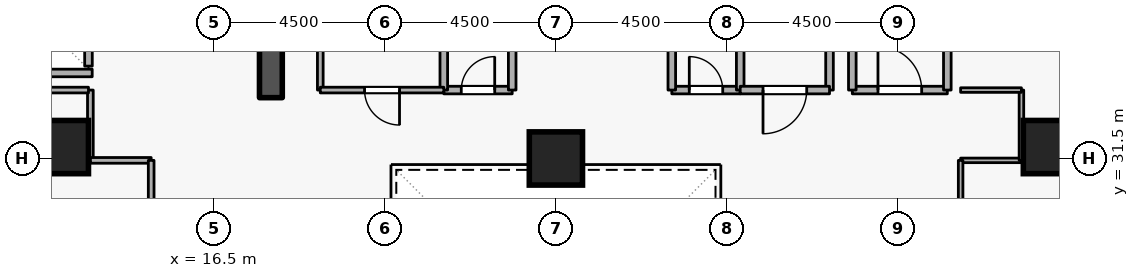
"""IFC4 building model, lengths in metres.
Left out: names, types, materials, properties, quantities, classifications, styles, units other than length and angle.
Written with IfcOpenShell. Run it as: python <this file> out.ifc"""

import sys

from ifc_helpers import new_model, si_unit, direction, frame, frame_2d, origin, origin_2d, place, context, subcontext, project, spatial, rectangle, extrude, element, fill, save


model = new_model("IFC4")
c1 = context("Model", 3, precision=1e-05, world=origin(), true_north=direction((0.0, 1.0)))
c2 = subcontext(c1, "Body", "Model", "MODEL_VIEW")
j1 = project(units=[si_unit("LENGTHUNIT", "METRE"), si_unit("PLANEANGLEUNIT", "RADIAN")], contexts=[c1])
p1 = place(None, origin())
s1 = spatial("IfcSite", under=j1, at=p1, CompositionType="ELEMENT")
p2 = place(p1, origin())
s2 = spatial("IfcBuilding", under=s1, at=p2, CompositionType="ELEMENT")
p3 = place(p2, frame((0.0, 0.0, 35.1)))
s3 = spatial("IfcBuildingStorey", under=s2, at=p3, CompositionType="ELEMENT", Elevation=35.1)
p4 = place(p3, frame((18.0, 33.1, 0.0), z_axis=(0.0, 0.0, 1.0), x_axis=(0.0, 1.0, 0.0)))
e1 = element("IfcWall", 1, at=p4, inside=s3, PredefinedType="SHEAR", context=c2, shape_type="SweptSolid", body=[
    extrude(rectangle(XDim=5.7, YDim=0.6, at=frame_2d((2.85, 0.0))), origin(), (0.0, 0.0, 1.0), 3.6),
])
for number, where, z_axis, x_axis in (
    (2, (12.5, 31.8, 0.0), (0.0, 0.0, 1.0), (1.0, 0.0, 0.0)),
    (3, (38.5, 31.8, 0.0), (0.0, 0.0, 1.0), (1.0, 0.0, 0.0)),
    (4, (25.5, 31.5, 0.0), (0.0, 0.0, 1.0), (1.0, 0.0, 0.0)),
):
    element("IfcColumn", number, at=place(p3, frame(where, z_axis=z_axis, x_axis=x_axis)), inside=s3, PredefinedType="COLUMN", context=c2, shape_type="SweptSolid", body=[
        extrude(rectangle(XDim=1.4, YDim=1.4, at=origin_2d()), origin(), (0.0, 0.0, 1.0), 3.6),
    ])
p5 = place(p3, frame((13.2, 33.93, 0.0), z_axis=(0.0, 0.0, 1.0), x_axis=(0.0, 1.0, 0.0)))
e5 = element("IfcWall", 5, at=p5, inside=s3, PredefinedType="STANDARD", context=c2, shape_type="SweptSolid", body=[
    extrude(rectangle(XDim=1.94, YDim=0.2, at=frame_2d((0.97, 0.0))), origin(), (0.0, 0.0, 1.0), 3.34),
])
p6 = place(p3, frame((11.002, 33.75, 0.0), z_axis=(0.0, 0.0, 1.0), x_axis=(1.0, 0.0, 0.0)))
e6 = element("IfcWall", 6, at=p6, inside=s3, PredefinedType="STANDARD", context=c2, shape_type="SweptSolid", body=[
    extrude(rectangle(XDim=2.296, YDim=0.2, at=frame_2d((1.148, 0.0))), origin(), (0.0, 0.0, 1.0), 3.34),
])
p7 = place(p3, frame((33.3, 33.3, 0.0), z_axis=(0.0, 0.0, 1.0), x_axis=(1.0, 0.0, 0.0)))
e7 = element("IfcWall", 7, at=p7, inside=s3, PredefinedType="STANDARD", context=c2, shape_type="SweptSolid", body=[
    extrude(rectangle(XDim=2.5, YDim=0.2, at=frame_2d((1.25, 0.0))), origin(), (0.0, 0.0, 1.0), 3.34),
])
p8 = place(p7, frame((0.675, 0.0, 0.0)))
e8 = element("IfcOpeningElement", 8, at=p8, cuts=e7, PredefinedType="OPENING", context=c2, shape_type="SweptSolid", body=[
    extrude(rectangle(XDim=1.15, YDim=2.1, at=frame_2d((0.575, 1.05))), frame((0.0, 0.11, 0.0), z_axis=(0.0, -1.0, 0.0), x_axis=(1.0, 0.0, 0.0)), (0.0, 0.0, 1.0), 0.22),
])
p9 = place(p3, frame((35.8, 33.3, 0.0), z_axis=(0.0, 0.0, 1.0), x_axis=(0.0, 1.0, 0.0)))
e9 = element("IfcWall", 9, at=p9, inside=s3, PredefinedType="STANDARD", context=c2, shape_type="SweptSolid", body=[
    extrude(rectangle(XDim=5.7, YDim=0.2, at=frame_2d((2.85, 0.0))), origin(), (0.0, 0.0, 1.0), 3.34),
])
p10 = place(p3, frame((33.3, 35.6, 0.0), z_axis=(0.0, 0.0, 1.0), x_axis=(0.0, -1.0, 0.0)))
e10 = element("IfcWall", 10, at=p10, inside=s3, PredefinedType="STANDARD", context=c2, shape_type="SweptSolid", body=[
    extrude(rectangle(XDim=2.3, YDim=0.2, at=frame_2d((1.15, 0.0))), origin(), (0.0, 0.0, 1.0), 2.545),
])
p11 = place(p3, frame((22.55, 33.3, 0.0), z_axis=(0.0, 0.0, 1.0), x_axis=(1.0, 0.0, 0.0)))
e11 = element("IfcWall", 11, at=p11, inside=s3, PredefinedType="STANDARD", context=c2, shape_type="SweptSolid", body=[
    extrude(rectangle(XDim=1.8, YDim=0.2, at=frame_2d((0.9, 0.0))), origin(), (0.0, 0.0, 1.0), 3.34),
])
p12 = place(p11, frame((0.46, 0.0, 0.0)))
e12 = element("IfcOpeningElement", 12, at=p12, cuts=e11, PredefinedType="OPENING", context=c2, shape_type="SweptSolid", body=[
    extrude(rectangle(XDim=0.88, YDim=2.04, at=frame_2d((0.44, 1.02))), frame((0.0, 0.11, 0.0), z_axis=(0.0, -1.0, 0.0), x_axis=(1.0, 0.0, 0.0)), (0.0, 0.0, 1.0), 0.22),
])
for number, where, z_axis, x_axis in (
    (13, (24.35, 33.3, 0.0), (0.0, 0.0, 1.0), (0.0, 1.0, 0.0)),
    (14, (22.55, 35.35, 0.0), (0.0, 0.0, 1.0), (0.0, -1.0, 0.0)),
):
    element("IfcWall", number, at=place(p3, frame(where, z_axis=z_axis, x_axis=x_axis)), inside=s3, PredefinedType="STANDARD", context=c2, shape_type="SweptSolid", body=[
        extrude(rectangle(XDim=2.05, YDim=0.2, at=frame_2d((1.025, 0.0))), origin(), (0.0, 0.0, 1.0), 3.34),
    ])
p13 = place(p3, frame((28.55, 33.3, 0.0), z_axis=(0.0, 0.0, 1.0), x_axis=(1.0, 0.0, 0.0)))
e15 = element("IfcWall", 15, at=p13, inside=s3, PredefinedType="STANDARD", context=c2, shape_type="SweptSolid", body=[
    extrude(rectangle(XDim=1.8, YDim=0.2, at=frame_2d((0.9, 0.0))), origin(), (0.0, 0.0, 1.0), 3.34),
])
p14 = place(p13, frame((0.46, 0.0, 0.0)))
e16 = element("IfcOpeningElement", 16, at=p14, cuts=e15, PredefinedType="OPENING", context=c2, shape_type="SweptSolid", body=[
    extrude(rectangle(XDim=0.88, YDim=2.04, at=frame_2d((0.44, 1.02))), frame((0.0, 0.11, 0.0), z_axis=(0.0, -1.0, 0.0), x_axis=(1.0, 0.0, 0.0)), (0.0, 0.0, 1.0), 0.22),
])
for number, where, z_axis, x_axis in (
    (17, (30.35, 33.3, 0.0), (0.0, 0.0, 1.0), (0.0, 1.0, 0.0)),
    (18, (28.55, 35.35, 0.0), (0.0, 0.0, 1.0), (0.0, -1.0, 0.0)),
):
    element("IfcWall", number, at=place(p3, frame(where, z_axis=z_axis, x_axis=x_axis)), inside=s3, PredefinedType="STANDARD", context=c2, shape_type="SweptSolid", body=[
        extrude(rectangle(XDim=2.05, YDim=0.2, at=frame_2d((1.025, 0.0))), origin(), (0.0, 0.0, 1.0), 3.34),
    ])
p15 = place(p3, frame((32.7, 35.35, 0.0), z_axis=(0.0, 0.0, 1.0), x_axis=(0.0, -1.0, 0.0)))
e19 = element("IfcWall", 19, at=p15, inside=s3, PredefinedType="STANDARD", context=c2, shape_type="SweptSolid", body=[
    extrude(rectangle(XDim=2.05, YDim=0.2, at=frame_2d((1.025, 0.0))), origin(), (0.0, 0.0, 1.0), 2.545),
])
p16 = place(p3, frame((32.7, 33.3, 0.0), z_axis=(0.0, 0.0, 1.0), x_axis=(-1.0, 0.0, 0.0)))
e20 = element("IfcWall", 20, at=p16, inside=s3, PredefinedType="STANDARD", context=c2, shape_type="SweptSolid", body=[
    extrude(rectangle(XDim=2.35, YDim=0.2, at=frame_2d((1.175, 0.0))), origin(), (0.0, 0.0, 1.0), 3.34),
])
p17 = place(p16, frame((0.6, 0.0, 0.0)))
e21 = element("IfcOpeningElement", 21, at=p17, cuts=e20, PredefinedType="OPENING", context=c2, shape_type="SweptSolid", body=[
    extrude(rectangle(XDim=1.15, YDim=2.1, at=frame_2d((0.575, 1.05))), frame((0.0, 0.11, 0.0), z_axis=(0.0, -1.0, 0.0), x_axis=(1.0, 0.0, 0.0)), (0.0, 0.0, 1.0), 0.22),
])
p18 = place(p3, frame((19.3, 33.3, 0.0), z_axis=(0.0, 0.0, 1.0), x_axis=(0.0, 1.0, 0.0)))
e22 = element("IfcWall", 22, at=p18, inside=s3, PredefinedType="PARTITIONING", context=c2, shape_type="SweptSolid", body=[
    extrude(rectangle(XDim=2.05, YDim=0.15, at=frame_2d((1.025, 0.0))), origin(), (0.0, 0.0, 1.0), 3.34),
])
p19 = place(p3, frame((22.55, 33.3, 0.0), z_axis=(0.0, 0.0, 1.0), x_axis=(-1.0, 0.0, 0.0)))
e23 = element("IfcWall", 23, at=p19, inside=s3, PredefinedType="PARTITIONING", context=c2, shape_type="SweptSolid", body=[
    extrude(rectangle(XDim=3.25, YDim=0.15, at=frame_2d((1.625, 0.0))), origin(), (0.0, 0.0, 1.0), 3.34),
])
p20 = place(p19, frame((1.165, 0.0, 0.0)))
e24 = element("IfcOpeningElement", 24, at=p20, cuts=e23, PredefinedType="OPENING", context=c2, shape_type="SweptSolid", body=[
    extrude(rectangle(XDim=0.92, YDim=2.08, at=frame_2d((0.46, 1.04))), frame((0.0, 0.085, 0.0), z_axis=(0.0, -1.0, 0.0), x_axis=(1.0, 0.0, 0.0)), (0.0, 0.0, 1.0), 0.17),
])
p21 = place(p3, frame((13.25, 33.3, 0.0), z_axis=(0.0, 0.0, 1.0), x_axis=(0.0, -1.0, 0.0)))
e25 = element("IfcWall", 25, at=p21, inside=s3, PredefinedType="PARTITIONING", context=c2, shape_type="SweptSolid", body=[
    extrude(rectangle(XDim=1.85, YDim=0.15, at=frame_2d((0.925, 0.0))), origin(), (0.0, 0.0, 1.0), 3.34),
])
p22 = place(p3, frame((13.25, 31.45, 0.0), z_axis=(0.0, 0.0, 1.0), x_axis=(1.0, 0.0, 0.0)))
e26 = element("IfcWall", 26, at=p22, inside=s3, PredefinedType="PARTITIONING", context=c2, shape_type="SweptSolid", body=[
    extrude(rectangle(XDim=1.6, YDim=0.15, at=frame_2d((0.8, 0.0))), origin(), (0.0, 0.0, 1.0), 3.34),
])
p23 = place(p3, frame((14.85, 31.45, 0.0), z_axis=(0.0, 0.0, 1.0), x_axis=(0.0, -1.0, 0.0)))
e27 = element("IfcWall", 27, at=p23, inside=s3, PredefinedType="PARTITIONING", context=c2, shape_type="SweptSolid", body=[
    extrude(rectangle(XDim=4.45, YDim=0.15, at=frame_2d((2.225, 0.0))), origin(), (0.0, 0.0, 1.0), 3.34),
])
p24 = place(p23, frame((1.575, 0.0, 0.0)))
e28 = element("IfcOpeningElement", 28, at=p24, cuts=e27, PredefinedType="OPENING", context=c2, shape_type="SweptSolid", body=[
    extrude(rectangle(XDim=1.3, YDim=2.12, at=frame_2d((0.65, 1.06))), frame((0.0, 0.085, 0.0), z_axis=(0.0, -1.0, 0.0), x_axis=(1.0, 0.0, 0.0)), (0.0, 0.0, 1.0), 0.17),
])
p25 = place(p3, frame((10.9, 33.3, 0.0), z_axis=(0.0, 0.0, 1.0), x_axis=(1.0, 0.0, 0.0)))
e29 = element("IfcWall", 29, at=p25, inside=s3, PredefinedType="PARTITIONING", context=c2, shape_type="SweptSolid", body=[
    extrude(rectangle(XDim=2.3, YDim=0.15, at=frame_2d((1.15, 0.0))), origin(), (0.0, 0.0, 1.0), 3.34),
])
p26 = place(p3, frame((36.15, 31.45, 0.0), z_axis=(0.0, 0.0, 1.0), x_axis=(1.0, 0.0, 0.0)))
e30 = element("IfcWall", 30, at=p26, inside=s3, PredefinedType="PARTITIONING", context=c2, shape_type="SweptSolid", body=[
    extrude(rectangle(XDim=1.6, YDim=0.12, at=frame_2d((0.8, 0.0))), origin(), (0.0, 0.0, 1.0), 3.34),
])
p27 = place(p3, frame((37.75, 31.45, 0.0), z_axis=(0.0, 0.0, 1.0), x_axis=(0.0, 1.0, 0.0)))
e31 = element("IfcWall", 31, at=p27, inside=s3, PredefinedType="PARTITIONING", context=c2, shape_type="SweptSolid", body=[
    extrude(rectangle(XDim=1.85, YDim=0.12, at=frame_2d((0.925, 0.0))), origin(), (0.0, 0.0, 1.0), 3.34),
])
p28 = place(p3, frame((37.75, 33.3, 0.0), z_axis=(0.0, 0.0, 1.0), x_axis=(-1.0, 0.0, 0.0)))
e32 = element("IfcWall", 32, at=p28, inside=s3, PredefinedType="PARTITIONING", context=c2, shape_type="SweptSolid", body=[
    extrude(rectangle(XDim=1.6, YDim=0.12, at=frame_2d((0.8, 0.0))), origin(), (0.0, 0.0, 1.0), 3.34),
])
p29 = place(p3, frame((36.15, 27.0, 0.0), z_axis=(0.0, 0.0, 1.0), x_axis=(0.0, 1.0, 0.0)))
e33 = element("IfcWall", 33, at=p29, inside=s3, PredefinedType="PARTITIONING", context=c2, shape_type="SweptSolid", body=[
    extrude(rectangle(XDim=4.45, YDim=0.12, at=frame_2d((2.225, 0.0))), origin(), (0.0, 0.0, 1.0), 3.34),
])
p30 = place(p29, frame((1.7, 0.0, 0.0)))
e34 = element("IfcOpeningElement", 34, at=p30, cuts=e33, PredefinedType="OPENING", context=c2, shape_type="SweptSolid", body=[
    extrude(rectangle(XDim=1.05, YDim=2.1, at=frame_2d((0.525, 1.05))), frame((0.0, 0.07, 0.0), z_axis=(0.0, -1.0, 0.0), x_axis=(1.0, 0.0, 0.0)), (0.0, 0.0, 1.0), 0.14),
])
p31 = place(p8, origin())
e35 = element("IfcDoor", 35, at=p31, inside=s3, OperationType="SINGLE_SWING_LEFT", PredefinedType="DOOR", context=c2, shape_type="SweptSolid", body=[
    extrude(rectangle(XDim=1.15, YDim=2.1, at=frame_2d((0.575, 1.05))), frame((0.0, 0.025, 0.0), z_axis=(0.0, -1.0, 0.0), x_axis=(1.0, 0.0, 0.0)), (0.0, 0.0, 1.0), 0.05),
])
fill(e8, e35)
p32 = place(p12, origin())
e36 = element("IfcDoor", 36, at=p32, inside=s3, OperationType="SINGLE_SWING_RIGHT", PredefinedType="DOOR", context=c2, shape_type="SweptSolid", body=[
    extrude(rectangle(XDim=0.88, YDim=2.04, at=frame_2d((0.44, 1.02))), frame((0.0, 0.025, 0.0), z_axis=(0.0, -1.0, 0.0), x_axis=(1.0, 0.0, 0.0)), (0.0, 0.0, 1.0), 0.05),
])
fill(e12, e36)
p33 = place(p14, origin())
e37 = element("IfcDoor", 37, at=p33, inside=s3, OperationType="SINGLE_SWING_LEFT", PredefinedType="DOOR", context=c2, shape_type="SweptSolid", body=[
    extrude(rectangle(XDim=0.88, YDim=2.04, at=frame_2d((0.44, 1.02))), frame((0.0, 0.025, 0.0), z_axis=(0.0, -1.0, 0.0), x_axis=(1.0, 0.0, 0.0)), (0.0, 0.0, 1.0), 0.05),
])
fill(e16, e37)
p34 = place(p20, origin())
e38 = element("IfcDoor", 38, at=p34, inside=s3, OperationType="SINGLE_SWING_LEFT", PredefinedType="DOOR", context=c2, shape_type="SweptSolid", body=[
    extrude(rectangle(XDim=0.92, YDim=2.08, at=frame_2d((0.46, 1.04))), frame((0.0, 0.025, 0.0), z_axis=(0.0, -1.0, 0.0), x_axis=(1.0, 0.0, 0.0)), (0.0, 0.0, 1.0), 0.05),
])
fill(e24, e38)
p35 = place(p17, origin())
e39 = element("IfcDoor", 39, at=p35, inside=s3, OperationType="SINGLE_SWING_RIGHT", PredefinedType="DOOR", context=c2, shape_type="SweptSolid", body=[
    extrude(rectangle(XDim=1.15, YDim=2.1, at=frame_2d((0.575, 1.05))), frame((0.0, 0.025, 0.0), z_axis=(0.0, -1.0, 0.0), x_axis=(1.0, 0.0, 0.0)), (0.0, 0.0, 1.0), 0.05),
])
fill(e21, e39)
save(model, sys.argv[1])
